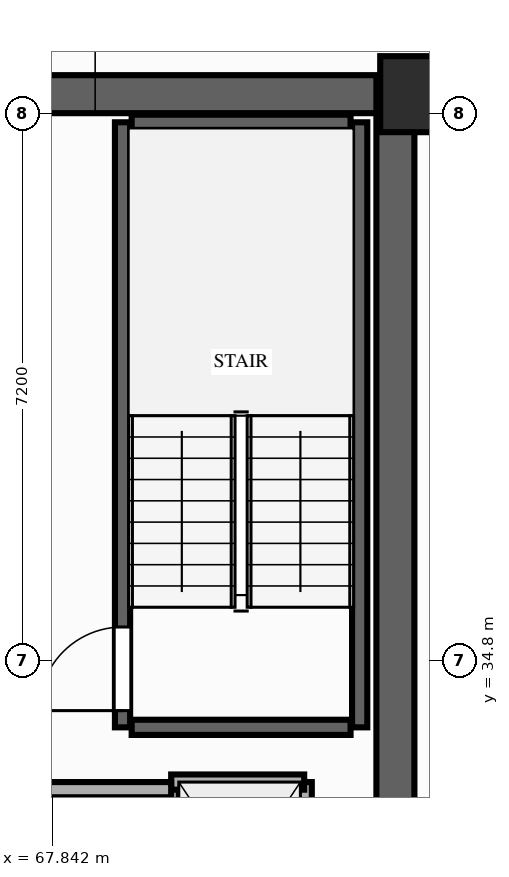
"""IFC4 building model, lengths in metres.
Left out: names, types, materials, properties, quantities, classifications, styles, units other than length and angle.
Written with IfcOpenShell. Run it as: python <this file> out.ifc"""

import sys

from ifc_helpers import new_model, si_unit, direction, frame, frame_2d, origin, origin_2d, place, context, subcontext, project, spatial, rectangle, extrude, element, fill, save


model = new_model("IFC4")
c1 = context("Model", 3, precision=1e-05, world=origin(), true_north=direction((0.0, 1.0)))
c2 = subcontext(c1, "Body", "Model", "MODEL_VIEW")
j1 = project(units=[si_unit("LENGTHUNIT", "METRE"), si_unit("PLANEANGLEUNIT", "RADIAN")], contexts=[c1])
p1 = place(None, origin())
s1 = spatial("IfcSite", under=j1, at=p1, CompositionType="ELEMENT")
p2 = place(p1, origin())
s2 = spatial("IfcBuilding", under=s1, at=p2, CompositionType="ELEMENT")
p3 = place(p2, frame((0.0, 0.0, 66.0)))
s3 = spatial("IfcBuildingStorey", under=s2, at=p3, CompositionType="ELEMENT", Elevation=66.0)
p4 = place(p3, frame((72.65, 42.25, 0.0), z_axis=(0.0, 0.0, 1.0), x_axis=(1.0, 0.0, 0.0)))
e1 = element("IfcColumn", 1, at=p4, inside=s3, PredefinedType="COLUMN", context=c2, shape_type="SweptSolid", body=[
    extrude(rectangle(XDim=1.0, YDim=1.0, at=origin_2d()), origin(), (0.0, 0.0, 1.0), 3.2),
])
p5 = place(p3, frame((72.35, 22.0, 0.0), z_axis=(0.0, 0.0, 1.0), x_axis=(0.0, 1.0, 0.0)))
e2 = element("IfcWall", 2, at=p5, inside=s3, PredefinedType="SHEAR", context=c2, shape_type="SweptSolid", body=[
    extrude(rectangle(XDim=20.25, YDim=0.5, at=frame_2d((10.125, 0.0))), origin(), (0.0, 0.0, 1.0), 3.02),
])
p6 = place(p3, frame((64.6, 42.25, 0.0), z_axis=(0.0, 0.0, 1.0), x_axis=(1.0, 0.0, 0.0)))
e3 = element("IfcWall", 3, at=p6, inside=s3, PredefinedType="SHEAR", context=c2, shape_type="SweptSolid", body=[
    extrude(rectangle(XDim=7.5, YDim=0.5, at=frame_2d((3.75, 0.0))), origin(), (0.0, 0.0, 1.0), 3.02),
])
p7 = place(p3, frame((68.76, 33.92, 0.0), z_axis=(0.0, 0.0, 1.0), x_axis=(0.0, 1.0, 0.0)))
e4 = element("IfcWall", 4, at=p7, inside=s3, PredefinedType="SHEAR", context=c2, shape_type="SweptSolid", body=[
    extrude(rectangle(XDim=7.96, YDim=0.2, at=frame_2d((3.98, 0.0))), origin(), (0.0, 0.0, 1.0), 3.02),
])
p8 = place(p7, frame((0.22, 0.0, 0.0)))
e5 = element("IfcOpeningElement", 5, at=p8, cuts=e4, PredefinedType="OPENING", context=c2, shape_type="SweptSolid", body=[
    extrude(rectangle(XDim=1.1, YDim=2.15, at=frame_2d((0.55, 1.075))), frame((0.0, 0.11, 0.0), z_axis=(0.0, -1.0, 0.0), x_axis=(1.0, 0.0, 0.0)), (0.0, 0.0, 1.0), 0.22),
])
p9 = place(p3, frame((71.88, 33.92, 0.0), z_axis=(0.0, 0.0, 1.0), x_axis=(0.0, 1.0, 0.0)))
e6 = element("IfcWall", 6, at=p9, inside=s3, PredefinedType="SHEAR", context=c2, shape_type="SweptSolid", body=[
    extrude(rectangle(XDim=7.96, YDim=0.2, at=frame_2d((3.98, 0.0))), origin(), (0.0, 0.0, 1.0), 3.02),
])
for number, where, z_axis, x_axis in (
    (7, (68.88, 41.88, 0.0), (0.0, 0.0, 1.0), (1.0, 0.0, 0.0)),
    (8, (68.88, 33.92, 0.0), (0.0, 0.0, 1.0), (1.0, 0.0, 0.0)),
):
    element("IfcWall", number, at=place(p3, frame(where, z_axis=z_axis, x_axis=x_axis)), inside=s3, PredefinedType="SHEAR", context=c2, shape_type="SweptSolid", body=[
        extrude(rectangle(XDim=2.88, YDim=0.2, at=frame_2d((1.44, 0.0))), origin(), (0.0, 0.0, 1.0), 3.02),
    ])
p10 = place(p3, frame((69.4, 30.75, 0.0), z_axis=(0.0, 0.0, 1.0), x_axis=(0.0, 1.0, 0.0)))
e9 = element("IfcWall", 9, at=p10, inside=s3, PredefinedType="MOVABLE", context=c2, shape_type="SweptSolid", body=[
    extrude(rectangle(XDim=2.45, YDim=0.2, at=frame_2d((1.225, 0.0))), origin(), (0.0, 0.0, 1.0), 3.02),
])
p11 = place(p10, frame((0.65, 0.0, 0.0)))
e10 = element("IfcOpeningElement", 10, at=p11, cuts=e9, PredefinedType="OPENING", context=c2, shape_type="SweptSolid", body=[
    extrude(rectangle(XDim=1.05, YDim=2.15, at=frame_2d((0.525, 1.075))), frame((0.0, 0.11, 0.0), z_axis=(0.0, -1.0, 0.0), x_axis=(1.0, 0.0, 0.0)), (0.0, 0.0, 1.0), 0.22),
])
p12 = place(p3, frame((71.15, 30.75, 0.0), z_axis=(0.0, 0.0, 1.0), x_axis=(0.0, 1.0, 0.0)))
e11 = element("IfcWall", 11, at=p12, inside=s3, PredefinedType="MOVABLE", context=c2, shape_type="SweptSolid", body=[
    extrude(rectangle(XDim=2.45, YDim=0.2, at=frame_2d((1.225, 0.0))), origin(), (0.0, 0.0, 1.0), 3.02),
])
p13 = place(p3, frame((69.4, 33.2, 0.0), z_axis=(0.0, 0.0, 1.0), x_axis=(1.0, 0.0, 0.0)))
e12 = element("IfcWall", 12, at=p13, inside=s3, PredefinedType="MOVABLE", context=c2, shape_type="SweptSolid", body=[
    extrude(rectangle(XDim=1.75, YDim=0.2, at=frame_2d((0.875, 0.0))), origin(), (0.0, 0.0, 1.0), 3.02),
])
p14 = place(p3, frame((65.8, 33.1, 0.0), z_axis=(0.0, 0.0, 1.0), x_axis=(1.0, 0.0, 0.0)))
e13 = element("IfcWall", 13, at=p14, inside=s3, PredefinedType="PARTITIONING", context=c2, shape_type="SweptSolid", body=[
    extrude(rectangle(XDim=3.6, YDim=0.2, at=frame_2d((1.8, 0.0))), origin(), (0.0, 0.0, 1.0), 3.02),
])
p15 = place(p8, origin())
e14 = element("IfcDoor", 14, at=p15, inside=s3, OperationType="SINGLE_SWING_LEFT", PredefinedType="DOOR", context=c2, shape_type="SweptSolid", body=[
    extrude(rectangle(XDim=1.1, YDim=2.15, at=frame_2d((0.55, 1.075))), frame((0.0, 0.025, 0.0), z_axis=(0.0, -1.0, 0.0), x_axis=(1.0, 0.0, 0.0)), (0.0, 0.0, 1.0), 0.05),
])
fill(e5, e14)
save(model, sys.argv[1])
